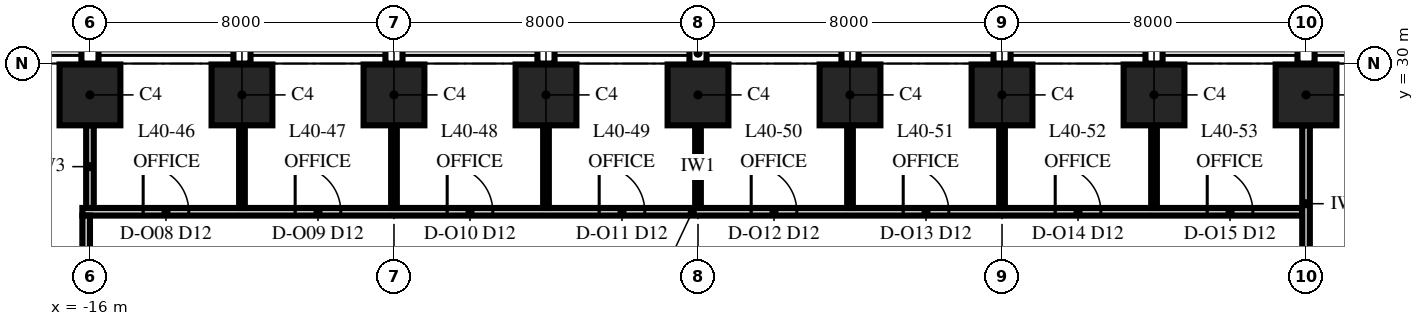
"""IFC4 building model, lengths in metres.
Left out: names, types, materials, properties, quantities, classifications, styles, units other than length and angle.
Written with IfcOpenShell. Run it as: python <this file> out.ifc"""

import sys

from ifc_helpers import new_model, si_unit, direction, frame, frame_2d, origin, origin_2d, place, context, subcontext, project, spatial, rectangle, extrude, element, fill, save


model = new_model("IFC4")
c1 = context("Model", 3, precision=1e-05, world=origin(), true_north=direction((0.0, 1.0)))
c2 = subcontext(c1, "Body", "Model", "MODEL_VIEW")
j1 = project(units=[si_unit("LENGTHUNIT", "METRE"), si_unit("PLANEANGLEUNIT", "RADIAN")], contexts=[c1])
p1 = place(None, origin())
s1 = spatial("IfcSite", under=j1, at=p1, CompositionType="ELEMENT")
p2 = place(p1, origin())
s2 = spatial("IfcBuilding", under=s1, at=p2, CompositionType="ELEMENT")
p3 = place(p2, frame((0.0, 0.0, 178.0)))
s3 = spatial("IfcBuildingStorey", under=s2, at=p3, CompositionType="ELEMENT", Elevation=178.0)
for number, where, z_axis, x_axis in (
    (1, (16.0, 29.175, 0.0), (0.0, 0.0, 1.0), (-1.0, 0.0, 0.0)),
    (2, (12.0, 29.175, 0.0), (0.0, 0.0, 1.0), (-1.0, 0.0, 0.0)),
    (3, (8.0, 29.175, 0.0), (0.0, 0.0, 1.0), (-1.0, 0.0, 0.0)),
    (4, (4.0, 29.175, 0.0), (0.0, 0.0, 1.0), (-1.0, 0.0, 0.0)),
    (5, (0.0, 29.175, 0.0), (0.0, 0.0, 1.0), (-1.0, 0.0, 0.0)),
    (6, (-4.0, 29.175, 0.0), (0.0, 0.0, 1.0), (-1.0, 0.0, 0.0)),
    (7, (-8.0, 29.175, 0.0), (0.0, 0.0, 1.0), (-1.0, 0.0, 0.0)),
    (8, (-12.0, 29.175, 0.0), (0.0, 0.0, 1.0), (-1.0, 0.0, 0.0)),
    (9, (-16.0, 29.175, 0.0), (0.0, 0.0, 1.0), (-1.0, 0.0, 0.0)),
):
    element("IfcColumn", number, at=place(p3, frame(where, z_axis=z_axis, x_axis=x_axis)), inside=s3, PredefinedType="COLUMN", context=c2, shape_type="SweptSolid", body=[
        extrude(rectangle(XDim=1.6, YDim=1.6, at=origin_2d()), origin(), (0.0, 0.0, 1.0), 4.0),
    ])
p4 = place(p3, frame((-16.2, 26.1, 0.0), z_axis=(0.0, 0.0, 1.0), x_axis=(1.0, 0.0, 0.0)))
e10 = element("IfcWall", 10, at=p4, inside=s3, PredefinedType="PARTITIONING", context=c2, shape_type="SweptSolid", body=[
    extrude(rectangle(XDim=32.1, YDim=0.2, at=frame_2d((16.05, 0.0))), origin(), (0.0, 0.0, 1.0), 3.4),
])
p5 = place(p4, frame((1.6, 0.0, 0.0)))
e11 = element("IfcOpeningElement", 11, at=p5, cuts=e10, PredefinedType="OPENING", context=c2, shape_type="SweptSolid", body=[
    extrude(rectangle(XDim=1.2, YDim=2.4, at=frame_2d((0.6, 1.2))), frame((0.0, 0.115, 0.0), z_axis=(0.0, -1.0, 0.0), x_axis=(1.0, 0.0, 0.0)), (0.0, 0.0, 1.0), 0.23),
])
p6 = place(p4, frame((5.6, 0.0, 0.0)))
e12 = element("IfcOpeningElement", 12, at=p6, cuts=e10, PredefinedType="OPENING", context=c2, shape_type="SweptSolid", body=[
    extrude(rectangle(XDim=1.2, YDim=2.4, at=frame_2d((0.6, 1.2))), frame((0.0, 0.115, 0.0), z_axis=(0.0, -1.0, 0.0), x_axis=(1.0, 0.0, 0.0)), (0.0, 0.0, 1.0), 0.23),
])
p7 = place(p4, frame((9.6, 0.0, 0.0)))
e13 = element("IfcOpeningElement", 13, at=p7, cuts=e10, PredefinedType="OPENING", context=c2, shape_type="SweptSolid", body=[
    extrude(rectangle(XDim=1.2, YDim=2.4, at=frame_2d((0.6, 1.2))), frame((0.0, 0.115, 0.0), z_axis=(0.0, -1.0, 0.0), x_axis=(1.0, 0.0, 0.0)), (0.0, 0.0, 1.0), 0.23),
])
p8 = place(p4, frame((13.6, 0.0, 0.0)))
e14 = element("IfcOpeningElement", 14, at=p8, cuts=e10, PredefinedType="OPENING", context=c2, shape_type="SweptSolid", body=[
    extrude(rectangle(XDim=1.2, YDim=2.4, at=frame_2d((0.6, 1.2))), frame((0.0, 0.115, 0.0), z_axis=(0.0, -1.0, 0.0), x_axis=(1.0, 0.0, 0.0)), (0.0, 0.0, 1.0), 0.23),
])
p9 = place(p4, frame((17.6, 0.0, 0.0)))
e15 = element("IfcOpeningElement", 15, at=p9, cuts=e10, PredefinedType="OPENING", context=c2, shape_type="SweptSolid", body=[
    extrude(rectangle(XDim=1.2, YDim=2.4, at=frame_2d((0.6, 1.2))), frame((0.0, 0.115, 0.0), z_axis=(0.0, -1.0, 0.0), x_axis=(1.0, 0.0, 0.0)), (0.0, 0.0, 1.0), 0.23),
])
p10 = place(p4, frame((21.6, 0.0, 0.0)))
e16 = element("IfcOpeningElement", 16, at=p10, cuts=e10, PredefinedType="OPENING", context=c2, shape_type="SweptSolid", body=[
    extrude(rectangle(XDim=1.2, YDim=2.4, at=frame_2d((0.6, 1.2))), frame((0.0, 0.115, 0.0), z_axis=(0.0, -1.0, 0.0), x_axis=(1.0, 0.0, 0.0)), (0.0, 0.0, 1.0), 0.23),
])
p11 = place(p4, frame((25.6, 0.0, 0.0)))
e17 = element("IfcOpeningElement", 17, at=p11, cuts=e10, PredefinedType="OPENING", context=c2, shape_type="SweptSolid", body=[
    extrude(rectangle(XDim=1.2, YDim=2.4, at=frame_2d((0.6, 1.2))), frame((0.0, 0.115, 0.0), z_axis=(0.0, -1.0, 0.0), x_axis=(1.0, 0.0, 0.0)), (0.0, 0.0, 1.0), 0.23),
])
p12 = place(p4, frame((29.6, 0.0, 0.0)))
e18 = element("IfcOpeningElement", 18, at=p12, cuts=e10, PredefinedType="OPENING", context=c2, shape_type="SweptSolid", body=[
    extrude(rectangle(XDim=1.2, YDim=2.4, at=frame_2d((0.6, 1.2))), frame((0.0, 0.115, 0.0), z_axis=(0.0, -1.0, 0.0), x_axis=(1.0, 0.0, 0.0)), (0.0, 0.0, 1.0), 0.23),
])
p13 = place(p3, frame((-16.1, 9.9, 0.0), z_axis=(0.0, 0.0, 1.0), x_axis=(0.0, 1.0, 0.0)))
e19 = element("IfcWall", 19, at=p13, inside=s3, PredefinedType="PARTITIONING", context=c2, shape_type="SweptSolid", body=[
    extrude(rectangle(XDim=16.1, YDim=0.2, at=frame_2d((8.05, 0.0))), origin(), (0.0, 0.0, 1.0), 3.25),
])
p14 = place(p13, frame((7.88, 0.0, 0.0)))
e20 = element("IfcOpeningElement", 20, at=p14, cuts=e19, PredefinedType="OPENING", context=c2, shape_type="SweptSolid", body=[
    extrude(rectangle(XDim=1.2, YDim=2.4, at=frame_2d((0.6, 1.2))), frame((0.0, 0.115, 0.0), z_axis=(0.0, -1.0, 0.0), x_axis=(1.0, 0.0, 0.0)), (0.0, 0.0, 1.0), 0.23),
])
p15 = place(p3, frame((-16.0, 26.2, 0.0), z_axis=(0.0, 0.0, 1.0), x_axis=(0.0, 1.0, 0.0)))
e21 = element("IfcWall", 21, at=p15, inside=s3, PredefinedType="PARTITIONING", context=c2, shape_type="SweptSolid", body=[
    extrude(rectangle(XDim=2.175, YDim=0.2, at=frame_2d((1.087, 0.0))), origin(), (0.0, 0.0, 1.0), 3.4),
])
for number, where, z_axis, x_axis in (
    (22, (-12.0, 26.2, 0.0), (0.0, 0.0, 1.0), (0.0, 1.0, 0.0)),
    (23, (-8.0, 26.2, 0.0), (0.0, 0.0, 1.0), (0.0, 1.0, 0.0)),
):
    element("IfcWall", number, at=place(p3, frame(where, z_axis=z_axis, x_axis=x_axis)), inside=s3, PredefinedType="PARTITIONING", context=c2, shape_type="SweptSolid", body=[
        extrude(rectangle(XDim=2.175, YDim=0.15, at=frame_2d((1.087, 0.0))), origin(), (0.0, 0.0, 1.0), 3.4),
    ])
p16 = place(p3, frame((-4.0, 26.2, 0.0), z_axis=(0.0, 0.0, 1.0), x_axis=(0.0, 1.0, 0.0)))
e24 = element("IfcWall", 24, at=p16, inside=s3, PredefinedType="PARTITIONING", context=c2, shape_type="SweptSolid", body=[
    extrude(rectangle(XDim=2.175, YDim=0.15, at=frame_2d((1.087, 0.0))), origin(), (0.0, 0.0, 1.0), 3.85),
])
p17 = place(p3, frame((0.0, 26.2, 0.0), z_axis=(0.0, 0.0, 1.0), x_axis=(0.0, 1.0, 0.0)))
e25 = element("IfcWall", 25, at=p17, inside=s3, PredefinedType="PARTITIONING", context=c2, shape_type="SweptSolid", body=[
    extrude(rectangle(XDim=2.175, YDim=0.15, at=frame_2d((1.087, 0.0))), origin(), (0.0, 0.0, 1.0), 3.4),
])
p18 = place(p3, frame((4.0, 26.2, 0.0), z_axis=(0.0, 0.0, 1.0), x_axis=(0.0, 1.0, 0.0)))
e26 = element("IfcWall", 26, at=p18, inside=s3, PredefinedType="PARTITIONING", context=c2, shape_type="SweptSolid", body=[
    extrude(rectangle(XDim=2.175, YDim=0.15, at=frame_2d((1.087, 0.0))), origin(), (0.0, 0.0, 1.0), 3.85),
])
for number, where, z_axis, x_axis in (
    (27, (8.0, 26.2, 0.0), (0.0, 0.0, 1.0), (0.0, 1.0, 0.0)),
    (28, (12.0, 26.2, 0.0), (0.0, 0.0, 1.0), (0.0, 1.0, 0.0)),
):
    element("IfcWall", number, at=place(p3, frame(where, z_axis=z_axis, x_axis=x_axis)), inside=s3, PredefinedType="PARTITIONING", context=c2, shape_type="SweptSolid", body=[
        extrude(rectangle(XDim=2.175, YDim=0.15, at=frame_2d((1.087, 0.0))), origin(), (0.0, 0.0, 1.0), 3.4),
    ])
p19 = place(p3, frame((16.0, 24.25, 0.0), z_axis=(0.0, 0.0, 1.0), x_axis=(0.0, 1.0, 0.0)))
e29 = element("IfcWall", 29, at=p19, inside=s3, PredefinedType="PARTITIONING", context=c2, shape_type="SweptSolid", body=[
    extrude(rectangle(XDim=4.125, YDim=0.2, at=frame_2d((2.062, 0.0))), origin(), (0.0, 0.0, 1.0), 3.4),
])
p20 = place(p5, origin())
e30 = element("IfcDoor", 30, at=p20, inside=s3, OperationType="SINGLE_SWING_LEFT", PredefinedType="DOOR", context=c2, shape_type="SweptSolid", body=[
    extrude(rectangle(XDim=1.2, YDim=2.4, at=frame_2d((0.6, 1.2))), frame((0.0, 0.1, 0.0), z_axis=(0.0, -1.0, 0.0), x_axis=(1.0, 0.0, 0.0)), (0.0, 0.0, 1.0), 0.199),
])
fill(e11, e30)
p21 = place(p6, origin())
e31 = element("IfcDoor", 31, at=p21, inside=s3, OperationType="SINGLE_SWING_LEFT", PredefinedType="DOOR", context=c2, shape_type="SweptSolid", body=[
    extrude(rectangle(XDim=1.2, YDim=2.4, at=frame_2d((0.6, 1.2))), frame((0.0, 0.1, 0.0), z_axis=(0.0, -1.0, 0.0), x_axis=(1.0, 0.0, 0.0)), (0.0, 0.0, 1.0), 0.199),
])
fill(e12, e31)
p22 = place(p7, origin())
e32 = element("IfcDoor", 32, at=p22, inside=s3, OperationType="SINGLE_SWING_LEFT", PredefinedType="DOOR", context=c2, shape_type="SweptSolid", body=[
    extrude(rectangle(XDim=1.2, YDim=2.4, at=frame_2d((0.6, 1.2))), frame((0.0, 0.1, 0.0), z_axis=(0.0, -1.0, 0.0), x_axis=(1.0, 0.0, 0.0)), (0.0, 0.0, 1.0), 0.199),
])
fill(e13, e32)
p23 = place(p8, origin())
e33 = element("IfcDoor", 33, at=p23, inside=s3, OperationType="SINGLE_SWING_LEFT", PredefinedType="DOOR", context=c2, shape_type="SweptSolid", body=[
    extrude(rectangle(XDim=1.2, YDim=2.4, at=frame_2d((0.6, 1.2))), frame((0.0, 0.1, 0.0), z_axis=(0.0, -1.0, 0.0), x_axis=(1.0, 0.0, 0.0)), (0.0, 0.0, 1.0), 0.199),
])
fill(e14, e33)
p24 = place(p9, origin())
e34 = element("IfcDoor", 34, at=p24, inside=s3, OperationType="SINGLE_SWING_LEFT", PredefinedType="DOOR", context=c2, shape_type="SweptSolid", body=[
    extrude(rectangle(XDim=1.2, YDim=2.4, at=frame_2d((0.6, 1.2))), frame((0.0, 0.1, 0.0), z_axis=(0.0, -1.0, 0.0), x_axis=(1.0, 0.0, 0.0)), (0.0, 0.0, 1.0), 0.199),
])
fill(e15, e34)
p25 = place(p10, origin())
e35 = element("IfcDoor", 35, at=p25, inside=s3, OperationType="SINGLE_SWING_LEFT", PredefinedType="DOOR", context=c2, shape_type="SweptSolid", body=[
    extrude(rectangle(XDim=1.2, YDim=2.4, at=frame_2d((0.6, 1.2))), frame((0.0, 0.1, 0.0), z_axis=(0.0, -1.0, 0.0), x_axis=(1.0, 0.0, 0.0)), (0.0, 0.0, 1.0), 0.199),
])
fill(e16, e35)
p26 = place(p11, origin())
e36 = element("IfcDoor", 36, at=p26, inside=s3, OperationType="SINGLE_SWING_LEFT", PredefinedType="DOOR", context=c2, shape_type="SweptSolid", body=[
    extrude(rectangle(XDim=1.2, YDim=2.4, at=frame_2d((0.6, 1.2))), frame((0.0, 0.1, 0.0), z_axis=(0.0, -1.0, 0.0), x_axis=(1.0, 0.0, 0.0)), (0.0, 0.0, 1.0), 0.199),
])
fill(e17, e36)
p27 = place(p12, origin())
e37 = element("IfcDoor", 37, at=p27, inside=s3, OperationType="SINGLE_SWING_LEFT", PredefinedType="DOOR", context=c2, shape_type="SweptSolid", body=[
    extrude(rectangle(XDim=1.2, YDim=2.4, at=frame_2d((0.6, 1.2))), frame((0.0, 0.1, 0.0), z_axis=(0.0, -1.0, 0.0), x_axis=(1.0, 0.0, 0.0)), (0.0, 0.0, 1.0), 0.199),
])
fill(e18, e37)
save(model, sys.argv[1])
